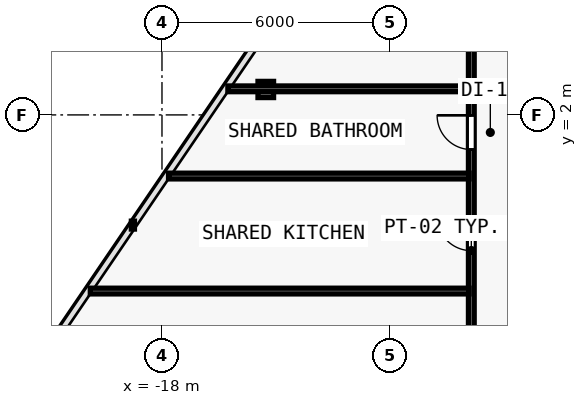
"""IFC4 building model, lengths in metres.
Left out: names, types, materials, properties, quantities, classifications, styles, units other than length and angle.
Written with IfcOpenShell. Run it as: python <this file> out.ifc"""

import sys

from ifc_helpers import new_model, si_unit, direction, frame, frame_2d, origin, origin_2d, place, context, subcontext, project, spatial, rectangle, i_section, extrude, element, fill, save


model = new_model("IFC4")
c1 = context("Model", 3, precision=1e-05, world=origin(), true_north=direction((0.0, 1.0)))
c2 = subcontext(c1, "Body", "Model", "MODEL_VIEW")
j1 = project(units=[si_unit("LENGTHUNIT", "METRE"), si_unit("PLANEANGLEUNIT", "RADIAN")], contexts=[c1])
p1 = place(None, origin())
s1 = spatial("IfcSite", under=j1, at=p1, CompositionType="ELEMENT")
p2 = place(p1, origin())
s2 = spatial("IfcBuilding", under=s1, at=p2, CompositionType="ELEMENT")
p3 = place(p2, frame((0.0, 0.0, 82.5)))
s3 = spatial("IfcBuildingStorey", under=s2, at=p3, CompositionType="ELEMENT", Elevation=82.5)
p4 = place(p3, frame((-15.269, 2.669, 0.006), z_axis=(0.017003572908, 0.009522000828, 0.999810086971), x_axis=(-0.488603368932, 0.87250601595, 0.0)))
e1 = element("IfcColumn", 1, at=p4, inside=s3, PredefinedType="COLUMN", context=c2, shape_type="SweptSolid", body=[
    extrude(i_section(OverallWidth=0.409, OverallDepth=0.425, WebThickness=0.021, FlangeThickness=0.034, FilletRadius=0.015, at=origin_2d()), origin(), (0.0, 0.0, 1.0), 3.59),
])
p5 = place(p3, frame((-9.86, -11.56, 0.0), z_axis=(0.0, 0.0, 1.0), x_axis=(0.0, 1.0, 0.0)))
e2 = element("IfcWall", 2, at=p5, inside=s3, PredefinedType="PARTITIONING", context=c2, shape_type="SweptSolid", body=[
    extrude(rectangle(XDim=19.986, YDim=0.15, at=frame_2d((9.993, 0.0))), origin(), (0.0, 0.0, 1.0), 2.609),
])
p6 = place(p5, frame((9.988, 0.0, 0.0)))
e3 = element("IfcOpeningElement", 3, at=p6, cuts=e2, PredefinedType="OPENING", context=c2, shape_type="SweptSolid", body=[
    extrude(rectangle(XDim=0.9, YDim=2.1, at=frame_2d((0.45, 1.05))), frame((0.0, 0.085, 0.0), z_axis=(0.0, -1.0, 0.0), x_axis=(1.0, 0.0, 0.0)), (0.0, 0.0, 1.0), 0.17),
])
p7 = place(p5, frame((6.925, 0.0, 0.0)))
e4 = element("IfcOpeningElement", 4, at=p7, cuts=e2, PredefinedType="OPENING", context=c2, shape_type="SweptSolid", body=[
    extrude(rectangle(XDim=0.9, YDim=2.1, at=frame_2d((0.45, 1.05))), frame((0.0, 0.085, 0.0), z_axis=(0.0, -1.0, 0.0), x_axis=(1.0, 0.0, 0.0)), (0.0, 0.0, 1.0), 0.17),
])
p8 = place(p5, frame((3.898, 0.0, 0.0)))
e5 = element("IfcOpeningElement", 5, at=p8, cuts=e2, PredefinedType="OPENING", context=c2, shape_type="SweptSolid", body=[
    extrude(rectangle(XDim=0.9, YDim=2.1, at=frame_2d((0.45, 1.05))), frame((0.0, 0.085, 0.0), z_axis=(0.0, -1.0, 0.0), x_axis=(1.0, 0.0, 0.0)), (0.0, 0.0, 1.0), 0.17),
])
p9 = place(p5, frame((1.076, 0.0, 0.0)))
e6 = element("IfcOpeningElement", 6, at=p9, cuts=e2, PredefinedType="OPENING", context=c2, shape_type="SweptSolid", body=[
    extrude(rectangle(XDim=0.9, YDim=2.1, at=frame_2d((0.45, 1.05))), frame((0.0, 0.085, 0.0), z_axis=(0.0, -1.0, 0.0), x_axis=(1.0, 0.0, 0.0)), (0.0, 0.0, 1.0), 0.17),
])
p10 = place(p5, frame((12.649, 0.0, 0.0)))
e7 = element("IfcOpeningElement", 7, at=p10, cuts=e2, PredefinedType="OPENING", context=c2, shape_type="SweptSolid", body=[
    extrude(rectangle(XDim=0.9, YDim=2.1, at=frame_2d((0.45, 1.05))), frame((0.0, 0.085, 0.0), z_axis=(0.0, -1.0, 0.0), x_axis=(1.0, 0.0, 0.0)), (0.0, 0.0, 1.0), 0.17),
])
p11 = place(p3, frame((-9.92, 2.686, 0.0), z_axis=(0.0, 0.0, 1.0), x_axis=(-1.0, 0.0, 0.0)))
e8 = element("IfcWall", 8, at=p11, inside=s3, PredefinedType="PARTITIONING", context=c2, shape_type="SweptSolid", body=[
    extrude(rectangle(XDim=6.345, YDim=0.15, at=frame_2d((3.173, 0.0))), origin(), (0.0, 0.0, 1.0), 2.835),
])
p12 = place(p3, frame((-9.92, -2.635, 0.0), z_axis=(0.0, 0.0, 1.0), x_axis=(-1.0, 0.0, 0.0)))
e9 = element("IfcWall", 9, at=p12, inside=s3, PredefinedType="PARTITIONING", context=c2, shape_type="SweptSolid", body=[
    extrude(rectangle(XDim=9.965, YDim=0.15, at=frame_2d((4.983, 0.0))), origin(), (0.0, 0.0, 1.0), 2.835),
])
p13 = place(p3, frame((-9.92, 0.391, 0.0), z_axis=(0.0, 0.0, 1.0), x_axis=(-1.0, 0.0, 0.0)))
e10 = element("IfcWall", 10, at=p13, inside=s3, PredefinedType="PARTITIONING", context=c2, shape_type="SweptSolid", body=[
    extrude(rectangle(XDim=7.907, YDim=0.15, at=frame_2d((3.953, 0.0))), origin(), (0.0, 0.0, 1.0), 2.835),
])
p14 = place(p6, origin())
e11 = element("IfcDoor", 11, at=p14, inside=s3, OperationType="SINGLE_SWING_RIGHT", PredefinedType="DOOR", context=c2, shape_type="SweptSolid", body=[
    extrude(rectangle(XDim=0.9, YDim=2.1, at=frame_2d((0.45, 1.05))), frame((0.0, 0.025, 0.0), z_axis=(0.0, -1.0, 0.0), x_axis=(1.0, 0.0, 0.0)), (0.0, 0.0, 1.0), 0.05),
])
fill(e3, e11)
p15 = place(p10, origin())
e12 = element("IfcDoor", 12, at=p15, inside=s3, OperationType="SINGLE_SWING_RIGHT", PredefinedType="DOOR", context=c2, shape_type="SweptSolid", body=[
    extrude(rectangle(XDim=0.9, YDim=2.1, at=frame_2d((0.45, 1.05))), frame((0.0, 0.025, 0.0), z_axis=(0.0, -1.0, 0.0), x_axis=(1.0, 0.0, 0.0)), (0.0, 0.0, 1.0), 0.05),
])
fill(e7, e12)
save(model, sys.argv[1])
